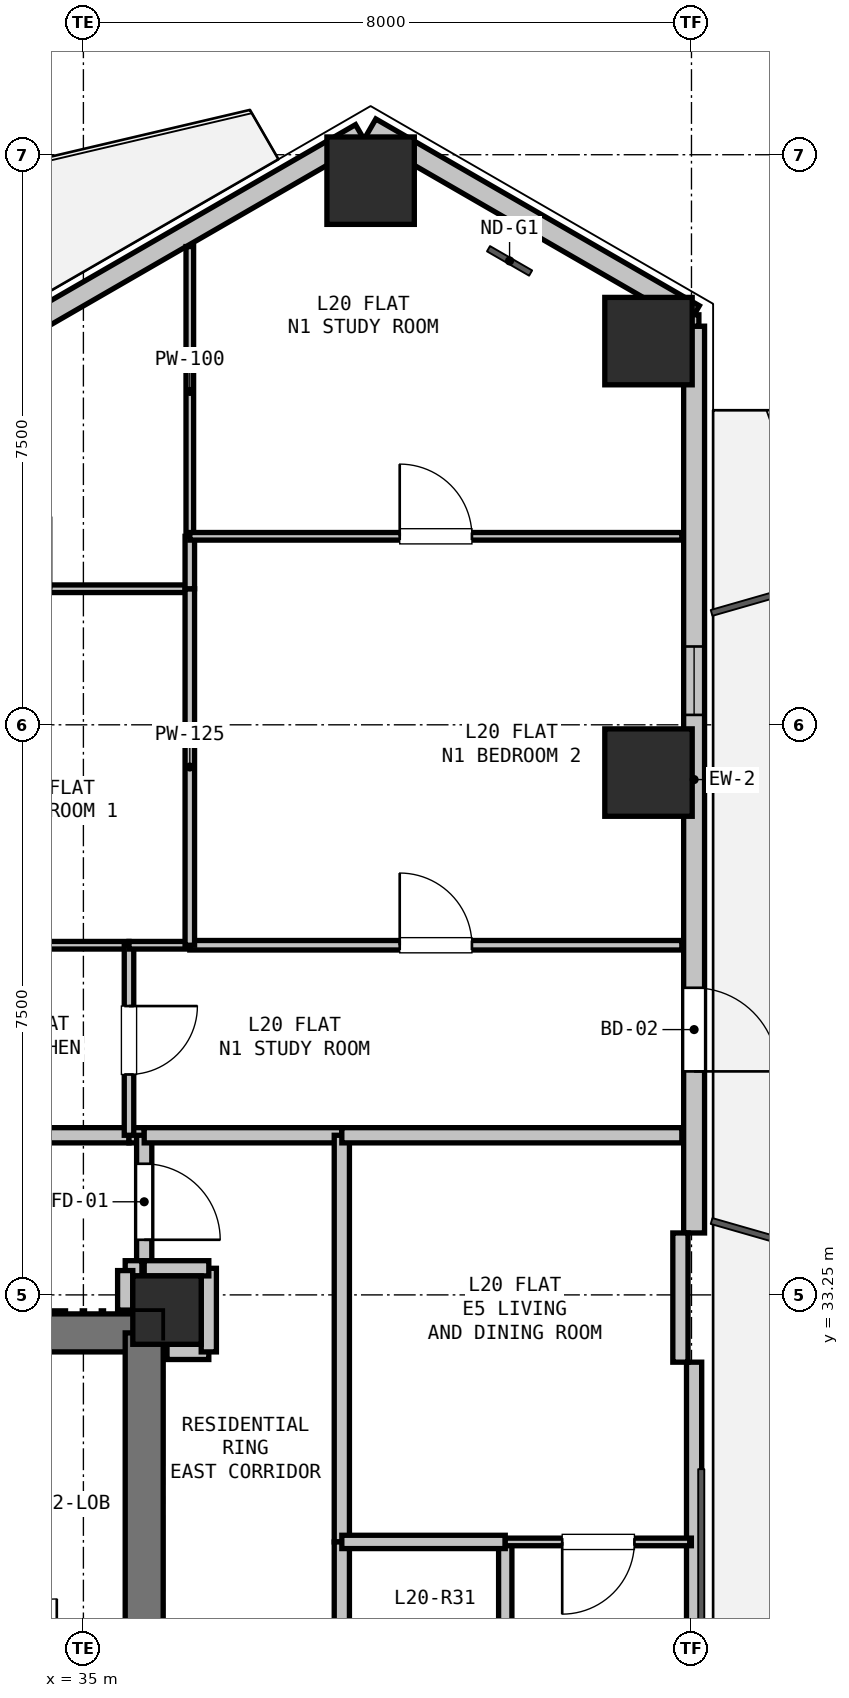
"""IFC4 building model, lengths in metres.
Left out: names, types, materials, properties, quantities, classifications, styles, units other than length and angle.
Written with IfcOpenShell. Run it as: python <this file> out.ifc"""

import sys

from ifc_helpers import new_model, si_unit, direction, frame, frame_2d, origin, origin_2d, place, context, subcontext, project, spatial, rectangle, hollow_rectangle, extrude, element, fill, save


model = new_model("IFC4")
c1 = context("Model", 3, precision=1e-05, world=origin(), true_north=direction((0.0, 1.0)))
c2 = subcontext(c1, "Body", "Model", "MODEL_VIEW")
j1 = project(units=[si_unit("LENGTHUNIT", "METRE"), si_unit("PLANEANGLEUNIT", "RADIAN")], contexts=[c1])
p1 = place(None, origin())
s1 = spatial("IfcSite", under=j1, at=p1, CompositionType="ELEMENT")
p2 = place(p1, origin())
s2 = spatial("IfcBuilding", under=s1, at=p2, CompositionType="ELEMENT")
p3 = place(p2, frame((0.0, 0.0, 76.8)))
s3 = spatial("IfcBuildingStorey", under=s2, at=p3, CompositionType="ELEMENT", Elevation=76.8)
p4 = place(p3, frame((36.1, 33.05, 0.0), z_axis=(0.0, 0.0, 1.0), x_axis=(1.0, 0.0, 0.0)))
e1 = element("IfcColumn", 1, at=p4, inside=s3, PredefinedType="COLUMN", context=c2, shape_type="SweptSolid", body=[
    extrude(rectangle(XDim=0.9, YDim=0.9, at=origin_2d()), origin(), (0.0, 0.0, 1.0), 3.3),
])
for number, where, z_axis, x_axis in (
    (2, (38.779, 47.909, 0.0), (0.0, 0.0, 1.0), (1.0, 0.0, 0.0)),
    (3, (42.435, 45.798, 0.0), (0.0, 0.0, 1.0), (1.0, 0.0, 0.0)),
    (4, (42.435, 40.122, 0.0), (0.0, 0.0, 1.0), (1.0, 0.0, 0.0)),
):
    element("IfcColumn", number, at=place(p3, frame(where, z_axis=z_axis, x_axis=x_axis)), inside=s3, PredefinedType="COLUMN", context=c2, shape_type="SweptSolid", body=[
        extrude(hollow_rectangle(XDim=1.15, YDim=1.15, WallThickness=0.032, at=origin_2d()), origin(), (0.0, 0.0, 1.0), 3.3),
    ])
p5 = place(p3, frame((38.779, 48.602, 0.0), z_axis=(0.0, 0.0, 1.0), x_axis=(0.866011848704, -0.500023477353, 0.0)))
e5 = element("IfcWall", 5, at=p5, inside=s3, PredefinedType="SOLIDWALL", context=c2, shape_type="SweptSolid", body=[
    extrude(rectangle(XDim=4.914, YDim=0.275, at=frame_2d((2.457, 0.0))), origin(), (0.0, 0.0, 1.0), 2.67),
])
p6 = place(p3, frame((28.317, 42.562, 0.0), z_axis=(0.0, 0.0, 1.0), x_axis=(0.866023023012, 0.500004123596, 0.0)))
e6 = element("IfcWall", 6, at=p6, inside=s3, PredefinedType="SOLIDWALL", context=c2, shape_type="SweptSolid", body=[
    extrude(rectangle(XDim=11.93, YDim=0.275, at=frame_2d((5.965, 0.0))), origin(), (0.0, 0.0, 1.0), 2.67),
])
p7 = place(p6, frame((2.427, 0.0, 0.9)))
e7 = element("IfcOpeningElement", 7, at=p7, cuts=e6, PredefinedType="OPENING", context=c2, shape_type="SweptSolid", body=[
    extrude(rectangle(XDim=0.9, YDim=1.4, at=frame_2d((0.45, 0.7))), frame((0.0, 0.147, 0.0), z_axis=(0.0, -1.0, 0.0), x_axis=(1.0, 0.0, 0.0)), (0.0, 0.0, 1.0), 0.295),
])
p8 = place(p3, frame((43.035, 45.994, 0.0), z_axis=(0.0, 0.0, 1.0), x_axis=(0.0, -1.0, 0.0)))
e8 = element("IfcWall", 8, at=p8, inside=s3, PredefinedType="SOLIDWALL", context=c2, shape_type="SweptSolid", body=[
    extrude(rectangle(XDim=11.93, YDim=0.275, at=frame_2d((5.965, 0.0))), origin(), (0.0, 0.0, 1.0), 2.67),
])
p9 = place(p8, frame((8.704, 0.0, 0.0)))
e9 = element("IfcOpeningElement", 9, at=p9, cuts=e8, PredefinedType="OPENING", context=c2, shape_type="SweptSolid", body=[
    extrude(rectangle(XDim=1.1, YDim=2.1, at=frame_2d((0.55, 1.05))), frame((0.0, 0.147, 0.0), z_axis=(0.0, -1.0, 0.0), x_axis=(1.0, 0.0, 0.0)), (0.0, 0.0, 1.0), 0.295),
])
p10 = place(p8, frame((4.214, 0.0, 0.9)))
e10 = element("IfcOpeningElement", 10, at=p10, cuts=e8, PredefinedType="OPENING", context=c2, shape_type="SweptSolid", body=[
    extrude(rectangle(XDim=0.9, YDim=1.4, at=frame_2d((0.45, 0.7))), frame((0.0, 0.147, 0.0), z_axis=(0.0, -1.0, 0.0), x_axis=(1.0, 0.0, 0.0)), (0.0, 0.0, 1.0), 0.295),
])
p11 = place(p3, frame((43.035, 32.365, 0.0), z_axis=(0.0, 0.0, 1.0), x_axis=(0.0, -1.0, 0.0)))
e11 = element("IfcWall", 11, at=p11, inside=s3, PredefinedType="PARAPET", context=c2, shape_type="SweptSolid", body=[
    extrude(rectangle(XDim=11.229, YDim=0.2, at=frame_2d((5.615, 0.0))), origin(), (0.0, 0.0, 1.0), 0.2),
])
p12 = place(p3, frame((42.854, 34.065, 0.0), z_axis=(0.0, 0.0, 1.0), x_axis=(0.0, -1.0, 0.0)))
e12 = element("IfcWall", 12, at=p12, inside=s3, PredefinedType="PARAPET", context=c2, shape_type="SweptSolid", body=[
    extrude(rectangle(XDim=1.7, YDim=0.2, at=frame_2d((0.85, 0.0))), origin(), (0.0, 0.0, 1.0), 2.67),
])
p13 = place(p3, frame((32.35, 32.75, 0.0), z_axis=(0.0, 0.0, 1.0), x_axis=(1.0, 0.0, 0.0)))
e13 = element("IfcWall", 13, at=p13, inside=s3, PredefinedType="SHEAR", context=c2, shape_type="SweptSolid", body=[
    extrude(rectangle(XDim=3.45, YDim=0.5, at=frame_2d((1.725, 0.0))), origin(), (0.0, 0.0, 1.0), 3.05),
])
p14 = place(p13, frame((0.65, 0.0, 0.0)))
e14 = element("IfcOpeningElement", 14, at=p14, cuts=e13, PredefinedType="OPENING", context=c2, shape_type="SweptSolid", body=[
    extrude(rectangle(XDim=1.15, YDim=2.15, at=frame_2d((0.575, 1.075))), frame((0.0, 0.26, 0.0), z_axis=(0.0, -1.0, 0.0), x_axis=(1.0, 0.0, 0.0)), (0.0, 0.0, 1.0), 0.52),
])
p15 = place(p3, frame((35.8, 32.75, 0.0), z_axis=(0.0, 0.0, 1.0), x_axis=(0.0, -1.0, 0.0)))
e15 = element("IfcWall", 15, at=p15, inside=s3, PredefinedType="SHEAR", context=c2, shape_type="SweptSolid", body=[
    extrude(rectangle(XDim=4.65, YDim=0.5, at=frame_2d((2.325, 0.0))), origin(), (0.0, 0.0, 1.0), 3.05),
])
p16 = place(p3, frame((32.0, 35.35, 0.0), z_axis=(0.0, 0.0, 1.0), x_axis=(1.0, 0.0, 0.0)))
e16 = element("IfcWall", 16, at=p16, inside=s3, PredefinedType="PARTITIONING", context=c2, shape_type="SweptSolid", body=[
    extrude(rectangle(XDim=3.6, YDim=0.2, at=frame_2d((1.8, 0.0))), origin(), (0.0, 0.0, 1.0), 3.05),
])
p17 = place(p3, frame((35.6, 35.35, 0.0), z_axis=(0.0, 0.0, 1.0), x_axis=(1.0, 0.0, 0.0)))
e17 = element("IfcWall", 17, at=p17, inside=s3, PredefinedType="PARTITIONING", context=c2, shape_type="SweptSolid", body=[
    extrude(rectangle(XDim=0.2, YDim=0.2, at=frame_2d((0.1, 0.0))), origin(), (0.0, 0.0, 1.0), 3.05),
])
p18 = place(p3, frame((35.8, 35.35, 0.0), z_axis=(0.0, 0.0, 1.0), x_axis=(0.0, -1.0, 0.0)))
e18 = element("IfcWall", 18, at=p18, inside=s3, PredefinedType="PARTITIONING", context=c2, shape_type="SweptSolid", body=[
    extrude(rectangle(XDim=1.75, YDim=0.2, at=frame_2d((0.875, 0.0))), origin(), (0.0, 0.0, 1.0), 3.05),
])
p19 = place(p18, frame((0.375, 0.0, 0.0)))
e19 = element("IfcOpeningElement", 19, at=p19, cuts=e18, PredefinedType="OPENING", context=c2, shape_type="SweptSolid", body=[
    extrude(rectangle(XDim=1.0, YDim=2.15, at=frame_2d((0.5, 1.075))), frame((0.0, 0.11, 0.0), z_axis=(0.0, -1.0, 0.0), x_axis=(1.0, 0.0, 0.0)), (0.0, 0.0, 1.0), 0.22),
])
p20 = place(p3, frame((35.77, 33.6, 0.0), z_axis=(0.0, 0.0, 1.0), x_axis=(-1.0, 0.0, 0.0)))
e20 = element("IfcWall", 20, at=p20, inside=s3, PredefinedType="PARTITIONING", context=c2, shape_type="SweptSolid", body=[
    extrude(rectangle(XDim=0.22, YDim=0.2, at=frame_2d((0.11, 0.0))), origin(), (0.0, 0.0, 1.0), 3.05),
])
p21 = place(p3, frame((35.55, 33.57, 0.0), z_axis=(0.0, 0.0, 1.0), x_axis=(0.0, -1.0, 0.0)))
e21 = element("IfcWall", 21, at=p21, inside=s3, PredefinedType="PARTITIONING", context=c2, shape_type="SweptSolid", body=[
    extrude(rectangle(XDim=0.52, YDim=0.2, at=frame_2d((0.26, 0.0))), origin(), (0.0, 0.0, 1.0), 2.498),
])
p22 = place(p3, frame((36.1, 32.5, 0.0), z_axis=(0.0, 0.0, 1.0), x_axis=(1.0, 0.0, 0.0)))
e22 = element("IfcWall", 22, at=p22, inside=s3, PredefinedType="PARTITIONING", context=c2, shape_type="SweptSolid", body=[
    extrude(rectangle(XDim=0.55, YDim=0.2, at=frame_2d((0.275, 0.0))), origin(), (0.0, 0.0, 1.0), 2.498),
])
p23 = place(p3, frame((36.65, 32.5, 0.0), z_axis=(0.0, 0.0, 1.0), x_axis=(0.0, 1.0, 0.0)))
e23 = element("IfcWall", 23, at=p23, inside=s3, PredefinedType="PARTITIONING", context=c2, shape_type="SweptSolid", body=[
    extrude(rectangle(XDim=1.1, YDim=0.2, at=frame_2d((0.55, 0.0))), origin(), (0.0, 0.0, 1.0), 2.423),
])
p24 = place(p3, frame((36.65, 33.6, 0.0), z_axis=(0.0, 0.0, 1.0), x_axis=(-1.0, 0.0, 0.0)))
e24 = element("IfcWall", 24, at=p24, inside=s3, PredefinedType="PARTITIONING", context=c2, shape_type="SweptSolid", body=[
    extrude(rectangle(XDim=0.85, YDim=0.2, at=frame_2d((0.425, 0.0))), origin(), (0.0, 0.0, 1.0), 2.423),
])
p25 = place(p3, frame((35.8, 35.35, 0.0), z_axis=(0.0, 0.0, 1.0), x_axis=(1.0, 0.0, 0.0)))
e25 = element("IfcWall", 25, at=p25, inside=s3, PredefinedType="PARTITIONING", context=c2, shape_type="SweptSolid", body=[
    extrude(rectangle(XDim=2.6, YDim=0.2, at=frame_2d((1.3, 0.0))), origin(), (0.0, 0.0, 1.0), 2.423),
])
p26 = place(p3, frame((38.4, 35.35, 0.0), z_axis=(0.0, 0.0, 1.0), x_axis=(0.0, -1.0, 0.0)))
e26 = element("IfcWall", 26, at=p26, inside=s3, PredefinedType="PARTITIONING", context=c2, shape_type="SweptSolid", body=[
    extrude(rectangle(XDim=5.35, YDim=0.2, at=frame_2d((2.675, 0.0))), origin(), (0.0, 0.0, 1.0), 3.05),
])
p27 = place(p3, frame((38.4, 30.0, 0.0), z_axis=(0.0, 0.0, 1.0), x_axis=(0.0, -1.0, 0.0)))
e27 = element("IfcWall", 27, at=p27, inside=s3, PredefinedType="PARTITIONING", context=c2, shape_type="SweptSolid", body=[
    extrude(rectangle(XDim=2.4, YDim=0.2, at=frame_2d((1.2, 0.0))), origin(), (0.0, 0.0, 1.0), 3.05),
])
p28 = place(p3, frame((32.0, 37.85, 0.0), z_axis=(0.0, 0.0, 1.0), x_axis=(1.0, 0.0, 0.0)))
e28 = element("IfcWall", 28, at=p28, inside=s3, PredefinedType="PARTITIONING", context=c2, shape_type="SweptSolid", body=[
    extrude(rectangle(XDim=3.6, YDim=0.1, at=frame_2d((1.8, 0.0))), origin(), (0.0, 0.0, 1.0), 3.05),
])
p29 = place(p3, frame((35.6, 37.85, 0.0), z_axis=(0.0, 0.0, 1.0), x_axis=(0.0, -1.0, 0.0)))
e29 = element("IfcWall", 29, at=p29, inside=s3, PredefinedType="PARTITIONING", context=c2, shape_type="SweptSolid", body=[
    extrude(rectangle(XDim=2.5, YDim=0.125, at=frame_2d((1.25, 0.0))), origin(), (0.0, 0.0, 1.0), 3.05),
])
p30 = place(p29, frame((0.8, 0.0, 0.0)))
e30 = element("IfcOpeningElement", 30, at=p30, cuts=e29, PredefinedType="OPENING", context=c2, shape_type="SweptSolid", body=[
    extrude(rectangle(XDim=0.9, YDim=2.1, at=frame_2d((0.45, 1.05))), frame((0.0, 0.073, 0.0), z_axis=(0.0, -1.0, 0.0), x_axis=(1.0, 0.0, 0.0)), (0.0, 0.0, 1.0), 0.145),
])
p31 = place(p3, frame((40.55, 30.0, 0.0), z_axis=(0.0, 0.0, 1.0), x_axis=(0.0, -1.0, 0.0)))
e31 = element("IfcWall", 31, at=p31, inside=s3, PredefinedType="PLUMBINGWALL", context=c2, shape_type="SweptSolid", body=[
    extrude(rectangle(XDim=2.4, YDim=0.175, at=frame_2d((1.2, 0.0))), origin(), (0.0, 0.0, 1.0), 3.05),
])
p32 = place(p3, frame((38.4, 30.0, 0.0), z_axis=(0.0, 0.0, 1.0), x_axis=(1.0, 0.0, 0.0)))
e32 = element("IfcWall", 32, at=p32, inside=s3, PredefinedType="PLUMBINGWALL", context=c2, shape_type="SweptSolid", body=[
    extrude(rectangle(XDim=2.15, YDim=0.175, at=frame_2d((1.075, 0.0))), origin(), (0.0, 0.0, 1.0), 3.05),
])
p33 = place(p3, frame((42.873, 35.35, 0.0), z_axis=(0.0, 0.0, 1.0), x_axis=(-1.0, 0.0, 0.0)))
e33 = element("IfcWall", 33, at=p33, inside=s3, PredefinedType="PARTITIONING", context=c2, shape_type="SweptSolid", body=[
    extrude(rectangle(XDim=4.473, YDim=0.2, at=frame_2d((2.237, 0.0))), origin(), (0.0, 0.0, 1.0), 2.365),
])
p34 = place(p3, frame((35.6, 37.85, 0.0), z_axis=(0.0, 0.0, 1.0), x_axis=(1.0, 0.0, 0.0)))
e34 = element("IfcWall", 34, at=p34, inside=s3, PredefinedType="PARTITIONING", context=c2, shape_type="SweptSolid", body=[
    extrude(rectangle(XDim=0.8, YDim=0.1, at=frame_2d((0.4, 0.0))), origin(), (0.0, 0.0, 1.0), 3.05),
])
p35 = place(p3, frame((36.4, 37.85, 0.0), z_axis=(0.0, 0.0, 1.0), x_axis=(1.0, 0.0, 0.0)))
e35 = element("IfcWall", 35, at=p35, inside=s3, PredefinedType="PARTITIONING", context=c2, shape_type="SweptSolid", body=[
    extrude(rectangle(XDim=6.473, YDim=0.125, at=frame_2d((3.237, 0.0))), origin(), (0.0, 0.0, 1.0), 2.365),
])
p36 = place(p35, frame((2.762, 0.0, 0.0)))
e36 = element("IfcOpeningElement", 36, at=p36, cuts=e35, PredefinedType="OPENING", context=c2, shape_type="SweptSolid", body=[
    extrude(rectangle(XDim=0.95, YDim=2.1, at=frame_2d((0.475, 1.05))), frame((0.0, 0.073, 0.0), z_axis=(0.0, -1.0, 0.0), x_axis=(1.0, 0.0, 0.0)), (0.0, 0.0, 1.0), 0.145),
])
p37 = place(p3, frame((31.8, 42.54, 0.0), z_axis=(0.0, 0.0, 1.0), x_axis=(1.0, 0.0, 0.0)))
e37 = element("IfcWall", 37, at=p37, inside=s3, PredefinedType="PARTITIONING", context=c2, shape_type="SweptSolid", body=[
    extrude(rectangle(XDim=4.6, YDim=0.1, at=frame_2d((2.3, 0.0))), origin(), (0.0, 0.0, 1.0), 3.05),
])
p38 = place(p37, frame((1.825, 0.0, 0.0)))
e38 = element("IfcOpeningElement", 38, at=p38, cuts=e37, PredefinedType="OPENING", context=c2, shape_type="SweptSolid", body=[
    extrude(rectangle(XDim=0.95, YDim=2.1, at=frame_2d((0.475, 1.05))), frame((0.0, 0.06, 0.0), z_axis=(0.0, -1.0, 0.0), x_axis=(1.0, 0.0, 0.0)), (0.0, 0.0, 1.0), 0.12),
])
p39 = place(p3, frame((36.4, 42.54, 0.0), z_axis=(0.0, 0.0, 1.0), x_axis=(0.0, -1.0, 0.0)))
e39 = element("IfcWall", 39, at=p39, inside=s3, PredefinedType="PARTITIONING", context=c2, shape_type="SweptSolid", body=[
    extrude(rectangle(XDim=4.69, YDim=0.125, at=frame_2d((2.345, 0.0))), origin(), (0.0, 0.0, 1.0), 3.05),
])
p40 = place(p3, frame((36.4, 47.042, 0.0), z_axis=(0.0, 0.0, 1.0), x_axis=(0.0, -1.0, 0.0)))
e40 = element("IfcWall", 40, at=p40, inside=s3, PredefinedType="PARTITIONING", context=c2, shape_type="SweptSolid", body=[
    extrude(rectangle(XDim=3.812, YDim=0.1, at=frame_2d((1.906, 0.0))), origin(), (0.0, 0.0, 1.0), 2.66),
])
p41 = place(p3, frame((36.4, 43.23, 0.0), z_axis=(0.0, 0.0, 1.0), x_axis=(0.0, -1.0, 0.0)))
e41 = element("IfcWall", 41, at=p41, inside=s3, PredefinedType="PARTITIONING", context=c2, shape_type="SweptSolid", body=[
    extrude(rectangle(XDim=0.69, YDim=0.125, at=frame_2d((0.345, 0.0))), origin(), (0.0, 0.0, 1.0), 3.05),
])
p42 = place(p3, frame((36.4, 43.23, 0.0), z_axis=(0.0, 0.0, 1.0), x_axis=(1.0, 0.0, 0.0)))
e42 = element("IfcWall", 42, at=p42, inside=s3, PredefinedType="PARTITIONING", context=c2, shape_type="SweptSolid", body=[
    extrude(rectangle(XDim=6.473, YDim=0.1, at=frame_2d((3.237, 0.0))), origin(), (0.0, 0.0, 1.0), 2.423),
])
p43 = place(p42, frame((2.762, 0.0, 0.0)))
e43 = element("IfcOpeningElement", 43, at=p43, cuts=e42, PredefinedType="OPENING", context=c2, shape_type="SweptSolid", body=[
    extrude(rectangle(XDim=0.95, YDim=2.1, at=frame_2d((0.475, 1.05))), frame((0.0, 0.06, 0.0), z_axis=(0.0, -1.0, 0.0), x_axis=(1.0, 0.0, 0.0)), (0.0, 0.0, 1.0), 0.12),
])
p44 = place(p3, frame((43.035, 46.144, 0.0), z_axis=(0.0, 0.0, 1.0), x_axis=(0.0, -1.0, 0.0)))
e44 = element("IfcWall", 44, at=p44, inside=s3, PredefinedType="PARTITIONING", context=c2, shape_type="SweptSolid", body=[
    extrude(rectangle(XDim=0.15, YDim=0.125, at=frame_2d((0.075, 0.0))), origin(), (0.0, 0.0, 1.0), 3.05),
])
p45 = place(p3, frame((42.999, 30.0, 0.0), z_axis=(0.0, 0.0, 1.0), x_axis=(-1.0, 0.0, 0.0)))
e45 = element("IfcWall", 45, at=p45, inside=s3, PredefinedType="PARTITIONING", context=c2, shape_type="SweptSolid", body=[
    extrude(rectangle(XDim=2.448, YDim=0.1, at=frame_2d((1.224, 0.0))), origin(), (0.0, 0.0, 1.0), 2.365),
])
p46 = place(p45, frame((0.749, 0.0, 0.0)))
e46 = element("IfcOpeningElement", 46, at=p46, cuts=e45, PredefinedType="OPENING", context=c2, shape_type="SweptSolid", body=[
    extrude(rectangle(XDim=0.95, YDim=2.1, at=frame_2d((0.475, 1.05))), frame((0.0, 0.06, 0.0), z_axis=(0.0, -1.0, 0.0), x_axis=(1.0, 0.0, 0.0)), (0.0, 0.0, 1.0), 0.12),
])
p47 = place(p9, origin())
e47 = element("IfcDoor", 47, at=p47, inside=s3, OperationType="SINGLE_SWING_RIGHT", PredefinedType="DOOR", context=c2, shape_type="SweptSolid", body=[
    extrude(rectangle(XDim=1.1, YDim=2.1, at=frame_2d((0.55, 1.05))), frame((0.0, 0.025, 0.0), z_axis=(0.0, -1.0, 0.0), x_axis=(1.0, 0.0, 0.0)), (0.0, 0.0, 1.0), 0.05),
])
fill(e9, e47)
p48 = place(p10, origin())
e48 = element("IfcWindow", 48, at=p48, inside=s3, PartitioningType="SINGLE_PANEL", PredefinedType="WINDOW", context=c2, shape_type="SweptSolid", body=[
    extrude(rectangle(XDim=0.9, YDim=1.4, at=frame_2d((0.45, 0.7))), frame((0.0, 0.03, 0.0), z_axis=(0.0, -1.0, 0.0), x_axis=(1.0, 0.0, 0.0)), (0.0, 0.0, 1.0), 0.06),
])
fill(e10, e48)
p49 = place(p19, origin())
e49 = element("IfcDoor", 49, at=p49, inside=s3, OperationType="SINGLE_SWING_RIGHT", PredefinedType="DOOR", context=c2, shape_type="SweptSolid", body=[
    extrude(rectangle(XDim=1.0, YDim=2.15, at=frame_2d((0.5, 1.075))), frame((0.0, 0.025, 0.0), z_axis=(0.0, -1.0, 0.0), x_axis=(1.0, 0.0, 0.0)), (0.0, 0.0, 1.0), 0.05),
])
fill(e19, e49)
p50 = place(p36, origin())
e50 = element("IfcDoor", 50, at=p50, inside=s3, OperationType="SINGLE_SWING_LEFT", PredefinedType="DOOR", context=c2, shape_type="SweptSolid", body=[
    extrude(rectangle(XDim=0.95, YDim=2.1, at=frame_2d((0.475, 1.05))), frame((0.0, 0.025, 0.0), z_axis=(0.0, -1.0, 0.0), x_axis=(1.0, 0.0, 0.0)), (0.0, 0.0, 1.0), 0.05),
])
fill(e36, e50)
p51 = place(p43, origin())
e51 = element("IfcDoor", 51, at=p51, inside=s3, OperationType="SINGLE_SWING_LEFT", PredefinedType="DOOR", context=c2, shape_type="SweptSolid", body=[
    extrude(rectangle(XDim=0.95, YDim=2.1, at=frame_2d((0.475, 1.05))), frame((0.0, 0.025, 0.0), z_axis=(0.0, -1.0, 0.0), x_axis=(1.0, 0.0, 0.0)), (0.0, 0.0, 1.0), 0.05),
])
fill(e43, e51)
p52 = place(p46, origin())
e52 = element("IfcDoor", 52, at=p52, inside=s3, OperationType="SINGLE_SWING_RIGHT", PredefinedType="DOOR", context=c2, shape_type="SweptSolid", body=[
    extrude(rectangle(XDim=0.95, YDim=2.1, at=frame_2d((0.475, 1.05))), frame((0.0, 0.025, 0.0), z_axis=(0.0, -1.0, 0.0), x_axis=(1.0, 0.0, 0.0)), (0.0, 0.0, 1.0), 0.05),
])
fill(e46, e52)
p53 = place(p30, origin())
e53 = element("IfcDoor", 53, at=p53, inside=s3, OperationType="SINGLE_SWING_LEFT", PredefinedType="DOOR", context=c2, shape_type="SweptSolid", body=[
    extrude(rectangle(XDim=0.9, YDim=2.1, at=frame_2d((0.45, 1.05))), frame((0.0, 0.025, 0.0), z_axis=(0.0, -1.0, 0.0), x_axis=(1.0, 0.0, 0.0)), (0.0, 0.0, 1.0), 0.05),
])
fill(e30, e53)
save(model, sys.argv[1])
